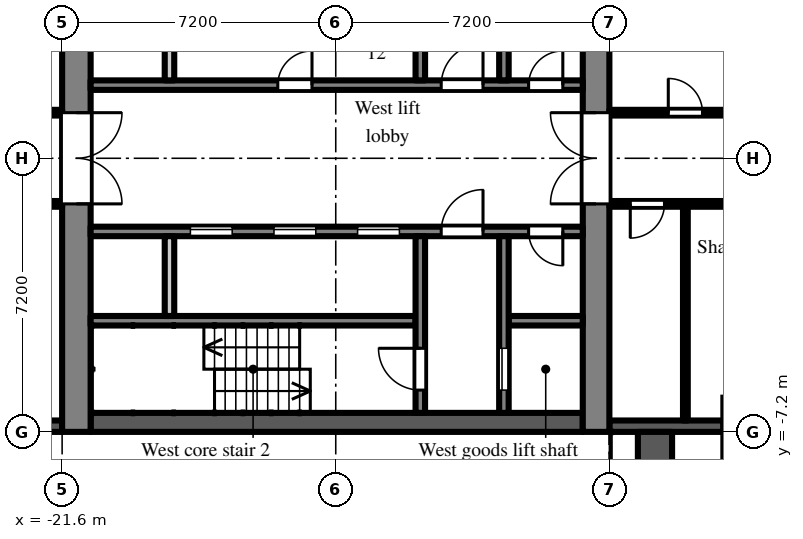
"""IFC4 building model, lengths in metres.
Left out: names, types, materials, properties, quantities, classifications, styles, units other than length and angle.
Written with IfcOpenShell. Run it as: python <this file> out.ifc"""

import sys

from ifc_helpers import new_model, si_unit, direction, frame, frame_2d, origin, place, context, subcontext, project, spatial, rectangle, extrude, element, fill, save


model = new_model("IFC4")
c1 = context("Model", 3, precision=1e-05, world=origin(), true_north=direction((0.0, 1.0)))
c2 = subcontext(c1, "Body", "Model", "MODEL_VIEW")
j1 = project(units=[si_unit("LENGTHUNIT", "METRE"), si_unit("PLANEANGLEUNIT", "RADIAN")], contexts=[c1])
p1 = place(None, origin())
s1 = spatial("IfcSite", under=j1, at=p1, CompositionType="ELEMENT")
p2 = place(p1, origin())
s2 = spatial("IfcBuilding", under=s1, at=p2, CompositionType="ELEMENT")
p3 = place(p2, frame((0.0, 0.0, 93.9)))
s3 = spatial("IfcBuildingStorey", under=s2, at=p3, CompositionType="ELEMENT", Elevation=93.9)
p4 = place(p3, frame((-24.3, -7.05, 0.0), z_axis=(0.0, 0.0, 1.0), x_axis=(1.0, 0.0, 0.0)))
e1 = element("IfcWall", 1, at=p4, inside=s3, PredefinedType="SOLIDWALL", context=c2, shape_type="SweptSolid", body=[
    extrude(rectangle(XDim=2.7, YDim=0.3, at=frame_2d((1.35, 0.0))), origin(), (0.0, 0.0, 1.0), 2.1),
])
p5 = place(p4, frame((0.75, 0.0, 0.2)))
e2 = element("IfcOpeningElement", 2, at=p5, cuts=e1, PredefinedType="OPENING", context=c2, shape_type="SweptSolid", body=[
    extrude(rectangle(XDim=1.2, YDim=1.85, at=frame_2d((0.6, 0.925))), frame((0.0, 0.16, 0.0), z_axis=(0.0, -1.0, 0.0), x_axis=(1.0, 0.0, 0.0)), (0.0, 0.0, 1.0), 0.32),
])
p6 = place(p3, frame((-7.2, -7.05, 0.0), z_axis=(0.0, 0.0, 1.0), x_axis=(1.0, 0.0, 0.0)))
e3 = element("IfcWall", 3, at=p6, inside=s3, PredefinedType="SOLIDWALL", context=c2, shape_type="SweptSolid", body=[
    extrude(rectangle(XDim=3.0, YDim=0.3, at=frame_2d((1.5, 0.0))), origin(), (0.0, 0.0, 1.0), 2.1),
])
p7 = place(p3, frame((-4.05, -7.2, 0.0), z_axis=(0.0, 0.0, 1.0), x_axis=(0.0, -1.0, 0.0)))
e4 = element("IfcWall", 4, at=p7, inside=s3, PredefinedType="SOLIDWALL", context=c2, shape_type="SweptSolid", body=[
    extrude(rectangle(XDim=7.2, YDim=0.3, at=frame_2d((3.6, 0.0))), origin(), (0.0, 0.0, 1.0), 2.1),
])
p8 = place(p7, frame((3.0, 0.0, 0.0)))
e5 = element("IfcOpeningElement", 5, at=p8, cuts=e4, PredefinedType="OPENING", context=c2, shape_type="SweptSolid", body=[
    extrude(rectangle(XDim=1.2, YDim=2.05, at=frame_2d((0.6, 1.025))), frame((0.0, 0.16, 0.0), z_axis=(0.0, -1.0, 0.0), x_axis=(1.0, 0.0, 0.0)), (0.0, 0.0, 1.0), 0.32),
])
p9 = place(p7, frame((0.9, 0.0, 0.2)))
e6 = element("IfcOpeningElement", 6, at=p9, cuts=e4, PredefinedType="OPENING", context=c2, shape_type="SweptSolid", body=[
    extrude(rectangle(XDim=1.8, YDim=1.85, at=frame_2d((0.9, 0.925))), frame((0.0, 0.16, 0.0), z_axis=(0.0, -1.0, 0.0), x_axis=(1.0, 0.0, 0.0)), (0.0, 0.0, 1.0), 0.32),
])
p10 = place(p7, frame((4.5, 0.0, 0.2)))
e7 = element("IfcOpeningElement", 7, at=p10, cuts=e4, PredefinedType="OPENING", context=c2, shape_type="SweptSolid", body=[
    extrude(rectangle(XDim=1.8, YDim=1.85, at=frame_2d((0.9, 0.925))), frame((0.0, 0.16, 0.0), z_axis=(0.0, -1.0, 0.0), x_axis=(1.0, 0.0, 0.0)), (0.0, 0.0, 1.0), 0.32),
])
p11 = place(p3, frame((-6.0, -14.4, 0.0), z_axis=(0.0, 0.0, 1.0), x_axis=(0.0, 1.0, 0.0)))
e8 = element("IfcWall", 8, at=p11, inside=s3, PredefinedType="PARAPET", context=c2, shape_type="SweptSolid", body=[
    extrude(rectangle(XDim=7.2, YDim=0.9, at=frame_2d((3.6, 0.0))), origin(), (0.0, 0.0, 1.0), 0.8),
])
p12 = place(p3, frame((-7.55, -7.2, 0.0), z_axis=(0.0, 0.0, 1.0), x_axis=(0.0, 1.0, 0.0)))
e9 = element("IfcWall", 9, at=p12, inside=s3, PredefinedType="SHEAR", context=c2, shape_type="SweptSolid", body=[
    extrude(rectangle(XDim=14.4, YDim=0.7, at=frame_2d((7.2, 0.0))), origin(), (0.0, 0.0, 1.0), 2.575),
])
p13 = place(p12, frame((6.0, 0.0, 0.0)))
e10 = element("IfcOpeningElement", 10, at=p13, cuts=e9, PredefinedType="OPENING", context=c2, shape_type="SweptSolid", body=[
    extrude(rectangle(XDim=2.4, YDim=2.2, at=frame_2d((1.2, 1.1))), frame((0.0, 0.36, 0.0), z_axis=(0.0, -1.0, 0.0), x_axis=(1.0, 0.0, 0.0)), (0.0, 0.0, 1.0), 0.72),
])
p14 = place(p3, frame((-21.225, -7.2, 0.0), z_axis=(0.0, 0.0, 1.0), x_axis=(0.0, 1.0, 0.0)))
e11 = element("IfcWall", 11, at=p14, inside=s3, PredefinedType="SHEAR", context=c2, shape_type="SweptSolid", body=[
    extrude(rectangle(XDim=14.4, YDim=0.75, at=frame_2d((7.2, 0.0))), origin(), (0.0, 0.0, 1.0), 2.575),
])
p15 = place(p14, frame((6.0, 0.0, 0.0)))
e12 = element("IfcOpeningElement", 12, at=p15, cuts=e11, PredefinedType="OPENING", context=c2, shape_type="SweptSolid", body=[
    extrude(rectangle(XDim=2.4, YDim=2.2, at=frame_2d((1.2, 1.1))), frame((0.0, 0.385, 0.0), z_axis=(0.0, -1.0, 0.0), x_axis=(1.0, 0.0, 0.0)), (0.0, 0.0, 1.0), 0.77),
])
p16 = place(p3, frame((-7.9, 1.925, 0.0), z_axis=(0.0, 0.0, 1.0), x_axis=(-1.0, 0.0, 0.0)))
e13 = element("IfcWall", 13, at=p16, inside=s3, PredefinedType="SHEAR", context=c2, shape_type="SweptSolid", body=[
    extrude(rectangle(XDim=12.95, YDim=0.25, at=frame_2d((6.475, 0.0))), origin(), (0.0, 0.0, 1.0), 2.575),
])
p17 = place(p16, frame((0.525, 0.0, 0.0)))
e14 = element("IfcOpeningElement", 14, at=p17, cuts=e13, PredefinedType="OPENING", context=c2, shape_type="SweptSolid", body=[
    extrude(rectangle(XDim=0.9, YDim=2.1, at=frame_2d((0.45, 1.05))), frame((0.0, 0.135, 0.0), z_axis=(0.0, -1.0, 0.0), x_axis=(1.0, 0.0, 0.0)), (0.0, 0.0, 1.0), 0.27),
])
p18 = place(p16, frame((2.625, 0.0, 0.0)))
e15 = element("IfcOpeningElement", 15, at=p18, cuts=e13, PredefinedType="OPENING", context=c2, shape_type="SweptSolid", body=[
    extrude(rectangle(XDim=1.1, YDim=2.1, at=frame_2d((0.55, 1.05))), frame((0.0, 0.135, 0.0), z_axis=(0.0, -1.0, 0.0), x_axis=(1.0, 0.0, 0.0)), (0.0, 0.0, 1.0), 0.27),
])
p19 = place(p16, frame((7.125, 0.0, 0.0)))
e16 = element("IfcOpeningElement", 16, at=p19, cuts=e13, PredefinedType="OPENING", context=c2, shape_type="SweptSolid", body=[
    extrude(rectangle(XDim=0.9, YDim=2.1, at=frame_2d((0.45, 1.05))), frame((0.0, 0.135, 0.0), z_axis=(0.0, -1.0, 0.0), x_axis=(1.0, 0.0, 0.0)), (0.0, 0.0, 1.0), 0.27),
])
p20 = place(p3, frame((-9.975, 2.05, 0.0), z_axis=(0.0, 0.0, 1.0), x_axis=(0.0, 1.0, 0.0)))
e17 = element("IfcWall", 17, at=p20, inside=s3, PredefinedType="SHEAR", context=c2, shape_type="SweptSolid", body=[
    extrude(rectangle(XDim=4.65, YDim=0.25, at=frame_2d((2.325, 0.0))), origin(), (0.0, 0.0, 1.0), 2.575),
])
p21 = place(p20, frame((2.95, 0.0, 0.0)))
e18 = element("IfcOpeningElement", 18, at=p21, cuts=e17, PredefinedType="OPENING", context=c2, shape_type="SweptSolid", body=[
    extrude(rectangle(XDim=1.1, YDim=2.1, at=frame_2d((0.55, 1.05))), frame((0.0, 0.135, 0.0), z_axis=(0.0, -1.0, 0.0), x_axis=(1.0, 0.0, 0.0)), (0.0, 0.0, 1.0), 0.27),
])
p22 = place(p3, frame((-12.175, 2.05, 0.0), z_axis=(0.0, 0.0, 1.0), x_axis=(0.0, 1.0, 0.0)))
e19 = element("IfcWall", 19, at=p22, inside=s3, PredefinedType="SHEAR", context=c2, shape_type="SweptSolid", body=[
    extrude(rectangle(XDim=4.65, YDim=0.25, at=frame_2d((2.325, 0.0))), origin(), (0.0, 0.0, 1.0), 2.575),
])
p23 = place(p22, frame((2.95, 0.0, 0.0)))
e20 = element("IfcOpeningElement", 20, at=p23, cuts=e19, PredefinedType="OPENING", context=c2, shape_type="SweptSolid", body=[
    extrude(rectangle(XDim=1.1, YDim=2.1, at=frame_2d((0.55, 1.05))), frame((0.0, 0.135, 0.0), z_axis=(0.0, -1.0, 0.0), x_axis=(1.0, 0.0, 0.0)), (0.0, 0.0, 1.0), 0.27),
])
p24 = place(p3, frame((-18.775, 2.05, 0.0), z_axis=(0.0, 0.0, 1.0), x_axis=(0.0, 1.0, 0.0)))
e21 = element("IfcWall", 21, at=p24, inside=s3, PredefinedType="PARTITIONING", context=c2, shape_type="SweptSolid", body=[
    extrude(rectangle(XDim=2.1, YDim=0.25, at=frame_2d((1.05, 0.0))), origin(), (0.0, 0.0, 1.0), 2.575),
])
p25 = place(p3, frame((-7.9, -6.95, 0.0), z_axis=(0.0, 0.0, 1.0), x_axis=(-1.0, 0.0, 0.0)))
e22 = element("IfcWall", 22, at=p25, inside=s3, PredefinedType="SHEAR", context=c2, shape_type="SweptSolid", body=[
    extrude(rectangle(XDim=12.95, YDim=0.5, at=frame_2d((6.475, 0.0))), origin(), (0.0, 0.0, 1.0), 2.575),
])
p26 = place(p3, frame((-7.9, -1.925, 0.0), z_axis=(0.0, 0.0, 1.0), x_axis=(-1.0, 0.0, 0.0)))
e23 = element("IfcWall", 23, at=p26, inside=s3, PredefinedType="SHEAR", context=c2, shape_type="SweptSolid", body=[
    extrude(rectangle(XDim=12.95, YDim=0.25, at=frame_2d((6.475, 0.0))), origin(), (0.0, 0.0, 1.0), 2.575),
])
p27 = place(p26, frame((4.825, 0.0, 0.0)))
e24 = element("IfcOpeningElement", 24, at=p27, cuts=e23, PredefinedType="OPENING", context=c2, shape_type="SweptSolid", body=[
    extrude(rectangle(XDim=1.1, YDim=2.1, at=frame_2d((0.55, 1.05))), frame((0.0, 0.135, 0.0), z_axis=(0.0, -1.0, 0.0), x_axis=(1.0, 0.0, 0.0)), (0.0, 0.0, 1.0), 0.27),
])
p28 = place(p26, frame((7.025, 0.0, 0.0)))
e25 = element("IfcOpeningElement", 25, at=p28, cuts=e23, PredefinedType="OPENING", context=c2, shape_type="SweptSolid", body=[
    extrude(rectangle(XDim=1.1, YDim=2.1, at=frame_2d((0.55, 1.05))), frame((0.0, 0.135, 0.0), z_axis=(0.0, -1.0, 0.0), x_axis=(1.0, 0.0, 0.0)), (0.0, 0.0, 1.0), 0.27),
])
p29 = place(p26, frame((9.225, 0.0, 0.0)))
e26 = element("IfcOpeningElement", 26, at=p29, cuts=e23, PredefinedType="OPENING", context=c2, shape_type="SweptSolid", body=[
    extrude(rectangle(XDim=1.1, YDim=2.1, at=frame_2d((0.55, 1.05))), frame((0.0, 0.135, 0.0), z_axis=(0.0, -1.0, 0.0), x_axis=(1.0, 0.0, 0.0)), (0.0, 0.0, 1.0), 0.27),
])
p30 = place(p26, frame((0.525, 0.0, 0.0)))
e27 = element("IfcOpeningElement", 27, at=p30, cuts=e23, PredefinedType="OPENING", context=c2, shape_type="SweptSolid", body=[
    extrude(rectangle(XDim=0.9, YDim=2.1, at=frame_2d((0.45, 1.05))), frame((0.0, 0.135, 0.0), z_axis=(0.0, -1.0, 0.0), x_axis=(1.0, 0.0, 0.0)), (0.0, 0.0, 1.0), 0.27),
])
p31 = place(p26, frame((2.625, 0.0, 0.0)))
e28 = element("IfcOpeningElement", 28, at=p31, cuts=e23, PredefinedType="OPENING", context=c2, shape_type="SweptSolid", body=[
    extrude(rectangle(XDim=1.1, YDim=2.1, at=frame_2d((0.55, 1.05))), frame((0.0, 0.135, 0.0), z_axis=(0.0, -1.0, 0.0), x_axis=(1.0, 0.0, 0.0)), (0.0, 0.0, 1.0), 0.27),
])
p32 = place(p3, frame((-7.9, -4.275, 0.0), z_axis=(0.0, 0.0, 1.0), x_axis=(-1.0, 0.0, 0.0)))
e29 = element("IfcWall", 29, at=p32, inside=s3, PredefinedType="SHEAR", context=c2, shape_type="SweptSolid", body=[
    extrude(rectangle(XDim=1.95, YDim=0.25, at=frame_2d((0.975, 0.0))), origin(), (0.0, 0.0, 1.0), 2.575),
])
p33 = place(p3, frame((-12.3, -4.275, 0.0), z_axis=(0.0, 0.0, 1.0), x_axis=(-1.0, 0.0, 0.0)))
e30 = element("IfcWall", 30, at=p33, inside=s3, PredefinedType="SHEAR", context=c2, shape_type="SweptSolid", body=[
    extrude(rectangle(XDim=8.55, YDim=0.25, at=frame_2d((4.275, 0.0))), origin(), (0.0, 0.0, 1.0), 2.575),
])
p34 = place(p3, frame((-9.975, -2.05, 0.0), z_axis=(0.0, 0.0, 1.0), x_axis=(0.0, -1.0, 0.0)))
e31 = element("IfcWall", 31, at=p34, inside=s3, PredefinedType="SHEAR", context=c2, shape_type="SweptSolid", body=[
    extrude(rectangle(XDim=4.65, YDim=0.25, at=frame_2d((2.325, 0.0))), origin(), (0.0, 0.0, 1.0), 2.575),
])
p35 = place(p34, frame((2.95, 0.0, 0.0)))
e32 = element("IfcOpeningElement", 32, at=p35, cuts=e31, PredefinedType="OPENING", context=c2, shape_type="SweptSolid", body=[
    extrude(rectangle(XDim=1.1, YDim=2.1, at=frame_2d((0.55, 1.05))), frame((0.0, 0.135, 0.0), z_axis=(0.0, -1.0, 0.0), x_axis=(1.0, 0.0, 0.0)), (0.0, 0.0, 1.0), 0.27),
])
p36 = place(p3, frame((-12.175, -2.05, 0.0), z_axis=(0.0, 0.0, 1.0), x_axis=(0.0, -1.0, 0.0)))
e33 = element("IfcWall", 33, at=p36, inside=s3, PredefinedType="SHEAR", context=c2, shape_type="SweptSolid", body=[
    extrude(rectangle(XDim=4.65, YDim=0.25, at=frame_2d((2.325, 0.0))), origin(), (0.0, 0.0, 1.0), 2.575),
])
p37 = place(p36, frame((2.95, 0.0, 0.0)))
e34 = element("IfcOpeningElement", 34, at=p37, cuts=e33, PredefinedType="OPENING", context=c2, shape_type="SweptSolid", body=[
    extrude(rectangle(XDim=1.1, YDim=2.1, at=frame_2d((0.55, 1.05))), frame((0.0, 0.135, 0.0), z_axis=(0.0, -1.0, 0.0), x_axis=(1.0, 0.0, 0.0)), (0.0, 0.0, 1.0), 0.27),
])
p38 = place(p3, frame((-18.775, -2.05, 0.0), z_axis=(0.0, 0.0, 1.0), x_axis=(0.0, -1.0, 0.0)))
e35 = element("IfcWall", 35, at=p38, inside=s3, PredefinedType="PARTITIONING", context=c2, shape_type="SweptSolid", body=[
    extrude(rectangle(XDim=2.1, YDim=0.25, at=frame_2d((1.05, 0.0))), origin(), (0.0, 0.0, 1.0), 2.575),
])
p39 = place(p3, frame((-36.5, -1.2, 0.0), z_axis=(0.0, 0.0, 1.0), x_axis=(1.0, 0.0, 0.0)))
e36 = element("IfcWall", 36, at=p39, inside=s3, PredefinedType="PARTITIONING", context=c2, shape_type="SweptSolid", body=[
    extrude(rectangle(XDim=14.9, YDim=0.15, at=frame_2d((7.45, 0.0))), origin(), (0.0, 0.0, 1.0), 2.575),
])
p40 = place(p39, frame((7.9, 0.0, 0.0)))
e37 = element("IfcOpeningElement", 37, at=p40, cuts=e36, PredefinedType="OPENING", context=c2, shape_type="SweptSolid", body=[
    extrude(rectangle(XDim=1.0, YDim=2.1, at=frame_2d((0.5, 1.05))), frame((0.0, 0.085, 0.0), z_axis=(0.0, -1.0, 0.0), x_axis=(1.0, 0.0, 0.0)), (0.0, 0.0, 1.0), 0.17),
])
p41 = place(p39, frame((5.45, 0.0, 0.0)))
e38 = element("IfcOpeningElement", 38, at=p41, cuts=e36, PredefinedType="OPENING", context=c2, shape_type="SweptSolid", body=[
    extrude(rectangle(XDim=0.9, YDim=2.1, at=frame_2d((0.45, 1.05))), frame((0.0, 0.085, 0.0), z_axis=(0.0, -1.0, 0.0), x_axis=(1.0, 0.0, 0.0)), (0.0, 0.0, 1.0), 0.17),
])
p42 = place(p39, frame((1.15, 0.0, 0.0)))
e39 = element("IfcOpeningElement", 39, at=p42, cuts=e36, PredefinedType="OPENING", context=c2, shape_type="SweptSolid", body=[
    extrude(rectangle(XDim=1.8, YDim=2.1, at=frame_2d((0.9, 1.05))), frame((0.0, 0.085, 0.0), z_axis=(0.0, -1.0, 0.0), x_axis=(1.0, 0.0, 0.0)), (0.0, 0.0, 1.0), 0.17),
])
p43 = place(p3, frame((-36.5, 1.2, 0.0), z_axis=(0.0, 0.0, 1.0), x_axis=(1.0, 0.0, 0.0)))
e40 = element("IfcWall", 40, at=p43, inside=s3, PredefinedType="PARTITIONING", context=c2, shape_type="SweptSolid", body=[
    extrude(rectangle(XDim=14.9, YDim=0.15, at=frame_2d((7.45, 0.0))), origin(), (0.0, 0.0, 1.0), 2.575),
])
p44 = place(p43, frame((10.4, 0.0, 0.0)))
e41 = element("IfcOpeningElement", 41, at=p44, cuts=e40, PredefinedType="OPENING", context=c2, shape_type="SweptSolid", body=[
    extrude(rectangle(XDim=1.8, YDim=2.1, at=frame_2d((0.9, 1.05))), frame((0.0, 0.085, 0.0), z_axis=(0.0, -1.0, 0.0), x_axis=(1.0, 0.0, 0.0)), (0.0, 0.0, 1.0), 0.17),
])
p45 = place(p43, frame((4.7, 0.0, 0.0)))
e42 = element("IfcOpeningElement", 42, at=p45, cuts=e40, PredefinedType="OPENING", context=c2, shape_type="SweptSolid", body=[
    extrude(rectangle(XDim=1.0, YDim=2.1, at=frame_2d((0.5, 1.05))), frame((0.0, 0.085, 0.0), z_axis=(0.0, -1.0, 0.0), x_axis=(1.0, 0.0, 0.0)), (0.0, 0.0, 1.0), 0.17),
])
p46 = place(p43, frame((1.15, 0.0, 0.0)))
e43 = element("IfcOpeningElement", 43, at=p46, cuts=e40, PredefinedType="OPENING", context=c2, shape_type="SweptSolid", body=[
    extrude(rectangle(XDim=1.8, YDim=2.1, at=frame_2d((0.9, 1.05))), frame((0.0, 0.085, 0.0), z_axis=(0.0, -1.0, 0.0), x_axis=(1.0, 0.0, 0.0)), (0.0, 0.0, 1.0), 0.17),
])
p47 = place(p3, frame((-7.2, -1.2, 0.0), z_axis=(0.0, 0.0, 1.0), x_axis=(1.0, 0.0, 0.0)))
e44 = element("IfcWall", 44, at=p47, inside=s3, PredefinedType="PARTITIONING", context=c2, shape_type="SweptSolid", body=[
    extrude(rectangle(XDim=6.075, YDim=0.15, at=frame_2d((3.038, 0.0))), origin(), (0.0, 0.0, 1.0), 2.575),
])
p48 = place(p47, frame((0.55, 0.0, 0.0)))
e45 = element("IfcOpeningElement", 45, at=p48, cuts=e44, PredefinedType="OPENING", context=c2, shape_type="SweptSolid", body=[
    extrude(rectangle(XDim=0.9, YDim=2.1, at=frame_2d((0.45, 1.05))), frame((0.0, 0.085, 0.0), z_axis=(0.0, -1.0, 0.0), x_axis=(1.0, 0.0, 0.0)), (0.0, 0.0, 1.0), 0.17),
])
p49 = place(p3, frame((-7.2, 1.2, 0.0), z_axis=(0.0, 0.0, 1.0), x_axis=(1.0, 0.0, 0.0)))
e46 = element("IfcWall", 46, at=p49, inside=s3, PredefinedType="PARTITIONING", context=c2, shape_type="SweptSolid", body=[
    extrude(rectangle(XDim=6.075, YDim=0.15, at=frame_2d((3.038, 0.0))), origin(), (0.0, 0.0, 1.0), 2.575),
])
p50 = place(p49, frame((1.55, 0.0, 0.0)))
e47 = element("IfcOpeningElement", 47, at=p50, cuts=e46, PredefinedType="OPENING", context=c2, shape_type="SweptSolid", body=[
    extrude(rectangle(XDim=0.9, YDim=2.1, at=frame_2d((0.45, 1.05))), frame((0.0, 0.085, 0.0), z_axis=(0.0, -1.0, 0.0), x_axis=(1.0, 0.0, 0.0)), (0.0, 0.0, 1.0), 0.17),
])
p51 = place(p3, frame((-5.2, -6.9, 0.0), z_axis=(0.0, 0.0, 1.0), x_axis=(0.0, 1.0, 0.0)))
e48 = element("IfcWall", 48, at=p51, inside=s3, PredefinedType="PARTITIONING", context=c2, shape_type="SweptSolid", body=[
    extrude(rectangle(XDim=5.625, YDim=0.125, at=frame_2d((2.812, 0.0))), origin(), (0.0, 0.0, 1.0), 2.575),
])
p52 = place(p27, origin())
e49 = element("IfcDoor", 49, at=p52, inside=s3, OperationType="SLIDING_TO_LEFT", PredefinedType="DOOR", context=c2, shape_type="SweptSolid", body=[
    extrude(rectangle(XDim=1.1, YDim=2.1, at=frame_2d((0.55, 1.05))), frame((0.0, 0.025, 0.0), z_axis=(0.0, -1.0, 0.0), x_axis=(1.0, 0.0, 0.0)), (0.0, 0.0, 1.0), 0.05),
])
fill(e24, e49)
p53 = place(p28, origin())
e50 = element("IfcDoor", 50, at=p53, inside=s3, OperationType="SLIDING_TO_LEFT", PredefinedType="DOOR", context=c2, shape_type="SweptSolid", body=[
    extrude(rectangle(XDim=1.1, YDim=2.1, at=frame_2d((0.55, 1.05))), frame((0.0, 0.025, 0.0), z_axis=(0.0, -1.0, 0.0), x_axis=(1.0, 0.0, 0.0)), (0.0, 0.0, 1.0), 0.05),
])
fill(e25, e50)
p54 = place(p29, origin())
e51 = element("IfcDoor", 51, at=p54, inside=s3, OperationType="SLIDING_TO_LEFT", PredefinedType="DOOR", context=c2, shape_type="SweptSolid", body=[
    extrude(rectangle(XDim=1.1, YDim=2.1, at=frame_2d((0.55, 1.05))), frame((0.0, 0.025, 0.0), z_axis=(0.0, -1.0, 0.0), x_axis=(1.0, 0.0, 0.0)), (0.0, 0.0, 1.0), 0.05),
])
fill(e26, e51)
p55 = place(p35, origin())
e52 = element("IfcDoor", 52, at=p55, inside=s3, OperationType="SLIDING_TO_LEFT", PredefinedType="DOOR", context=c2, shape_type="SweptSolid", body=[
    extrude(rectangle(XDim=1.1, YDim=2.1, at=frame_2d((0.55, 1.05))), frame((0.0, 0.025, 0.0), z_axis=(0.0, -1.0, 0.0), x_axis=(1.0, 0.0, 0.0)), (0.0, 0.0, 1.0), 0.05),
])
fill(e32, e52)
p56 = place(p37, frame((1.1, 0.0, 0.0), z_axis=(0.0, 0.0, 1.0), x_axis=(-1.0, 0.0, 0.0)))
e53 = element("IfcDoor", 53, at=p56, inside=s3, OperationType="SINGLE_SWING_RIGHT", PredefinedType="DOOR", context=c2, shape_type="SweptSolid", body=[
    extrude(rectangle(XDim=1.1, YDim=2.1, at=frame_2d((0.55, 1.05))), frame((0.0, 0.025, 0.0), z_axis=(0.0, -1.0, 0.0), x_axis=(1.0, 0.0, 0.0)), (0.0, 0.0, 1.0), 0.05),
])
fill(e34, e53)
p57 = place(p17, frame((0.9, 0.0, 0.0), z_axis=(0.0, 0.0, 1.0), x_axis=(-1.0, 0.0, 0.0)))
e54 = element("IfcDoor", 54, at=p57, inside=s3, OperationType="SINGLE_SWING_RIGHT", PredefinedType="DOOR", context=c2, shape_type="SweptSolid", body=[
    extrude(rectangle(XDim=0.9, YDim=2.1, at=frame_2d((0.45, 1.05))), frame((0.0, 0.025, 0.0), z_axis=(0.0, -1.0, 0.0), x_axis=(1.0, 0.0, 0.0)), (0.0, 0.0, 1.0), 0.05),
])
fill(e14, e54)
p58 = place(p30, origin())
e55 = element("IfcDoor", 55, at=p58, inside=s3, OperationType="SINGLE_SWING_LEFT", PredefinedType="DOOR", context=c2, shape_type="SweptSolid", body=[
    extrude(rectangle(XDim=0.9, YDim=2.1, at=frame_2d((0.45, 1.05))), frame((0.0, 0.025, 0.0), z_axis=(0.0, -1.0, 0.0), x_axis=(1.0, 0.0, 0.0)), (0.0, 0.0, 1.0), 0.05),
])
fill(e27, e55)
p59 = place(p18, frame((1.1, 0.0, 0.0), z_axis=(0.0, 0.0, 1.0), x_axis=(-1.0, 0.0, 0.0)))
e56 = element("IfcDoor", 56, at=p59, inside=s3, OperationType="SINGLE_SWING_RIGHT", PredefinedType="DOOR", context=c2, shape_type="SweptSolid", body=[
    extrude(rectangle(XDim=1.1, YDim=2.1, at=frame_2d((0.55, 1.05))), frame((0.0, 0.025, 0.0), z_axis=(0.0, -1.0, 0.0), x_axis=(1.0, 0.0, 0.0)), (0.0, 0.0, 1.0), 0.05),
])
fill(e15, e56)
p60 = place(p31, frame((1.1, 0.0, 0.0), z_axis=(0.0, 0.0, 1.0), x_axis=(-1.0, 0.0, 0.0)))
e57 = element("IfcDoor", 57, at=p60, inside=s3, OperationType="SINGLE_SWING_RIGHT", PredefinedType="DOOR", context=c2, shape_type="SweptSolid", body=[
    extrude(rectangle(XDim=1.1, YDim=2.1, at=frame_2d((0.55, 1.05))), frame((0.0, 0.025, 0.0), z_axis=(0.0, -1.0, 0.0), x_axis=(1.0, 0.0, 0.0)), (0.0, 0.0, 1.0), 0.05),
])
fill(e28, e57)
p61 = place(p13, origin())
e58 = element("IfcDoor", 58, at=p61, inside=s3, OperationType="DOUBLE_DOOR_DOUBLE_SWING", PredefinedType="DOOR", context=c2, shape_type="SweptSolid", body=[
    extrude(rectangle(XDim=2.4, YDim=2.2, at=frame_2d((1.2, 1.1))), frame((0.0, 0.025, 0.0), z_axis=(0.0, -1.0, 0.0), x_axis=(1.0, 0.0, 0.0)), (0.0, 0.0, 1.0), 0.05),
])
fill(e10, e58)
p62 = place(p15, frame((2.4, 0.0, 0.0), z_axis=(0.0, 0.0, 1.0), x_axis=(-1.0, 0.0, 0.0)))
e59 = element("IfcDoor", 59, at=p62, inside=s3, OperationType="DOUBLE_DOOR_DOUBLE_SWING", PredefinedType="DOOR", context=c2, shape_type="SweptSolid", body=[
    extrude(rectangle(XDim=2.4, YDim=2.2, at=frame_2d((1.2, 1.1))), frame((0.0, 0.025, 0.0), z_axis=(0.0, -1.0, 0.0), x_axis=(1.0, 0.0, 0.0)), (0.0, 0.0, 1.0), 0.05),
])
fill(e12, e59)
p63 = place(p19, frame((0.9, 0.0, 0.0), z_axis=(0.0, 0.0, 1.0), x_axis=(-1.0, 0.0, 0.0)))
e60 = element("IfcDoor", 60, at=p63, inside=s3, OperationType="SINGLE_SWING_RIGHT", PredefinedType="DOOR", context=c2, shape_type="SweptSolid", body=[
    extrude(rectangle(XDim=0.9, YDim=2.1, at=frame_2d((0.45, 1.05))), frame((0.0, 0.025, 0.0), z_axis=(0.0, -1.0, 0.0), x_axis=(1.0, 0.0, 0.0)), (0.0, 0.0, 1.0), 0.05),
])
fill(e16, e60)
p64 = place(p50, origin())
e61 = element("IfcDoor", 61, at=p64, inside=s3, OperationType="SINGLE_SWING_LEFT", PredefinedType="DOOR", context=c2, shape_type="SweptSolid", body=[
    extrude(rectangle(XDim=0.9, YDim=2.1, at=frame_2d((0.45, 1.05))), frame((0.0, 0.025, 0.0), z_axis=(0.0, -1.0, 0.0), x_axis=(1.0, 0.0, 0.0)), (0.0, 0.0, 1.0), 0.05),
])
fill(e47, e61)
p65 = place(p48, frame((0.9, 0.0, 0.0), z_axis=(0.0, 0.0, 1.0), x_axis=(-1.0, 0.0, 0.0)))
e62 = element("IfcDoor", 62, at=p65, inside=s3, OperationType="SINGLE_SWING_RIGHT", PredefinedType="DOOR", context=c2, shape_type="SweptSolid", body=[
    extrude(rectangle(XDim=0.9, YDim=2.1, at=frame_2d((0.45, 1.05))), frame((0.0, 0.025, 0.0), z_axis=(0.0, -1.0, 0.0), x_axis=(1.0, 0.0, 0.0)), (0.0, 0.0, 1.0), 0.05),
])
fill(e45, e62)
save(model, sys.argv[1])
